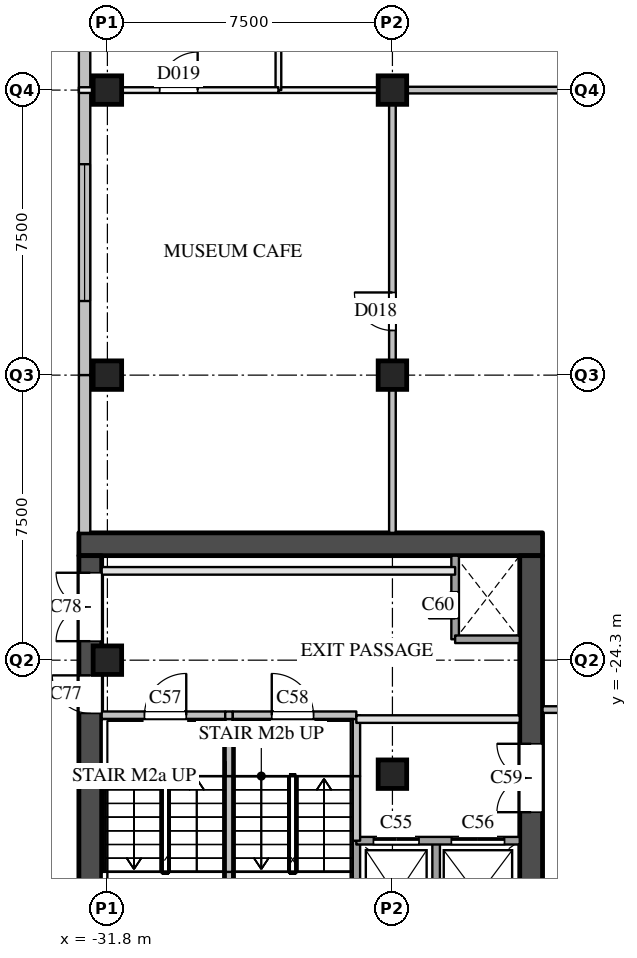
"""IFC4 building model, lengths in metres.
Left out: names, types, materials, properties, quantities, classifications, styles, units other than length and angle.
Written with IfcOpenShell. Run it as: python <this file> out.ifc"""

import sys

from ifc_helpers import new_model, si_unit, direction, frame, frame_2d, origin, origin_2d, place, context, subcontext, project, spatial, rectangle, extrude, element, fill, save


model = new_model("IFC4")
c1 = context("Model", 3, precision=1e-05, world=origin(), true_north=direction((0.0, 1.0)))
c2 = subcontext(c1, "Body", "Model", "MODEL_VIEW")
j1 = project(units=[si_unit("LENGTHUNIT", "METRE"), si_unit("PLANEANGLEUNIT", "RADIAN")], contexts=[c1])
p1 = place(None, origin())
s1 = spatial("IfcSite", under=j1, at=p1, CompositionType="ELEMENT")
p2 = place(p1, origin())
s2 = spatial("IfcBuilding", under=s1, at=p2, CompositionType="ELEMENT")
p3 = place(p2, origin())
s3 = spatial("IfcBuildingStorey", under=s2, at=p3, CompositionType="ELEMENT", Elevation=0.0)
for number, where, z_axis, x_axis in (
    (1, (-31.8, -24.3, 0.0), (0.0, 0.0, 1.0), (1.0, 0.0, 0.0)),
    (2, (-31.8, -16.8, 0.0), (0.0, 0.0, 1.0), (1.0, 0.0, 0.0)),
    (3, (-31.8, -9.3, 0.0), (0.0, 0.0, 1.0), (1.0, 0.0, 0.0)),
    (4, (-24.3, -16.8, 0.0), (0.0, 0.0, 1.0), (1.0, 0.0, 0.0)),
    (5, (-24.3, -9.3, 0.0), (0.0, 0.0, 1.0), (1.0, 0.0, 0.0)),
    (6, (-24.3, -27.3, 0.0), (0.0, 0.0, 1.0), (1.0, 0.0, 0.0)),
):
    element("IfcColumn", number, at=place(p3, frame(where, z_axis=z_axis, x_axis=x_axis)), inside=s3, PredefinedType="COLUMN", context=c2, shape_type="SweptSolid", body=[
        extrude(rectangle(XDim=0.75, YDim=0.75, at=origin_2d()), origin(), (0.0, 0.0, 1.0), 8.0),
    ])
p4 = place(p3, frame((-32.4, -1.8, 0.0), z_axis=(0.0, 0.0, 1.0), x_axis=(0.0, -1.0, 0.0)))
e7 = element("IfcWall", 7, at=p4, inside=s3, PredefinedType="SOLIDWALL", context=c2, shape_type="SweptSolid", body=[
    extrude(rectangle(XDim=7.5, YDim=0.3, at=frame_2d((3.75, 0.0))), origin(), (0.0, 0.0, 1.0), 7.59),
])
p5 = place(p4, frame((1.95, 0.0, 0.9)))
e8 = element("IfcOpeningElement", 8, at=p5, cuts=e7, PredefinedType="OPENING", context=c2, shape_type="SweptSolid", body=[
    extrude(rectangle(XDim=3.6, YDim=3.0, at=frame_2d((1.8, 1.5))), frame((0.0, 0.16, 0.0), z_axis=(0.0, -1.0, 0.0), x_axis=(1.0, 0.0, 0.0)), (0.0, 0.0, 1.0), 0.32),
])
p6 = place(p3, frame((-32.4, -9.3, 0.0), z_axis=(0.0, 0.0, 1.0), x_axis=(0.0, -1.0, 0.0)))
e9 = element("IfcWall", 9, at=p6, inside=s3, PredefinedType="SOLIDWALL", context=c2, shape_type="SweptSolid", body=[
    extrude(rectangle(XDim=7.5, YDim=0.3, at=frame_2d((3.75, 0.0))), origin(), (0.0, 0.0, 1.0), 7.59),
])
p7 = place(p6, frame((1.95, 0.0, 0.9)))
e10 = element("IfcOpeningElement", 10, at=p7, cuts=e9, PredefinedType="OPENING", context=c2, shape_type="SweptSolid", body=[
    extrude(rectangle(XDim=3.6, YDim=3.0, at=frame_2d((1.8, 1.5))), frame((0.0, 0.16, 0.0), z_axis=(0.0, -1.0, 0.0), x_axis=(1.0, 0.0, 0.0)), (0.0, 0.0, 1.0), 0.32),
])
p8 = place(p3, frame((-32.4, -16.8, 0.0), z_axis=(0.0, 0.0, 1.0), x_axis=(0.0, -1.0, 0.0)))
e11 = element("IfcWall", 11, at=p8, inside=s3, PredefinedType="SOLIDWALL", context=c2, shape_type="SweptSolid", body=[
    extrude(rectangle(XDim=4.15, YDim=0.3, at=frame_2d((2.075, 0.0))), origin(), (0.0, 0.0, 1.0), 7.59),
])
p9 = place(p3, frame((-32.55, -21.25, 0.0), z_axis=(0.0, 0.0, 1.0), x_axis=(1.0, 0.0, 0.0)))
e12 = element("IfcWall", 12, at=p9, inside=s3, PredefinedType="SHEAR", context=c2, shape_type="SweptSolid", body=[
    extrude(rectangle(XDim=12.2, YDim=0.6, at=frame_2d((6.1, 0.0))), origin(), (0.0, 0.0, 1.0), 7.59),
])
p10 = place(p3, frame((-32.25, -31.95, 0.0), z_axis=(0.0, 0.0, 1.0), x_axis=(0.0, 1.0, 0.0)))
e13 = element("IfcWall", 13, at=p10, inside=s3, PredefinedType="SHEAR", context=c2, shape_type="SweptSolid", body=[
    extrude(rectangle(XDim=10.4, YDim=0.6, at=frame_2d((5.2, 0.0))), origin(), (0.0, 0.0, 1.0), 7.59),
])
p11 = place(p10, frame((6.25, 0.0, 0.0)))
e14 = element("IfcOpeningElement", 14, at=p11, cuts=e13, PredefinedType="OPENING", context=c2, shape_type="SweptSolid", body=[
    extrude(rectangle(XDim=1.0, YDim=2.1, at=frame_2d((0.5, 1.05))), frame((0.0, 0.31, 0.0), z_axis=(0.0, -1.0, 0.0), x_axis=(1.0, 0.0, 0.0)), (0.0, 0.0, 1.0), 0.62),
])
p12 = place(p10, frame((8.15, 0.0, 0.0)))
e15 = element("IfcOpeningElement", 15, at=p12, cuts=e13, PredefinedType="OPENING", context=c2, shape_type="SweptSolid", body=[
    extrude(rectangle(XDim=1.8, YDim=2.4, at=frame_2d((0.9, 1.2))), frame((0.0, 0.31, 0.0), z_axis=(0.0, -1.0, 0.0), x_axis=(1.0, 0.0, 0.0)), (0.0, 0.0, 1.0), 0.62),
])
p13 = place(p3, frame((-20.65, -31.95, 0.0), z_axis=(0.0, 0.0, 1.0), x_axis=(0.0, 1.0, 0.0)))
e16 = element("IfcWall", 16, at=p13, inside=s3, PredefinedType="SHEAR", context=c2, shape_type="SweptSolid", body=[
    extrude(rectangle(XDim=10.4, YDim=0.6, at=frame_2d((5.2, 0.0))), origin(), (0.0, 0.0, 1.0), 7.59),
])
p14 = place(p13, frame((3.65, 0.0, 0.0)))
e17 = element("IfcOpeningElement", 17, at=p14, cuts=e16, PredefinedType="OPENING", context=c2, shape_type="SweptSolid", body=[
    extrude(rectangle(XDim=1.8, YDim=2.1, at=frame_2d((0.9, 1.05))), frame((0.0, 0.31, 0.0), z_axis=(0.0, -1.0, 0.0), x_axis=(1.0, 0.0, 0.0)), (0.0, 0.0, 1.0), 0.62),
])
p15 = place(p3, frame((-28.6, -31.95, 0.0), z_axis=(0.0, 0.0, 1.0), x_axis=(0.0, 1.0, 0.0)))
e18 = element("IfcWall", 18, at=p15, inside=s3, PredefinedType="SOLIDWALL", context=c2, shape_type="SweptSolid", body=[
    extrude(rectangle(XDim=2.08, YDim=0.2, at=frame_2d((1.04, 0.0))), origin(), (0.0, 0.0, 1.0), 7.59),
])
p16 = place(p3, frame((-28.6, -29.87, 0.0), z_axis=(0.0, 0.0, 1.0), x_axis=(0.0, 1.0, 0.0)))
e19 = element("IfcWall", 19, at=p16, inside=s3, PredefinedType="SOLIDWALL", context=c2, shape_type="SweptSolid", body=[
    extrude(rectangle(XDim=2.52, YDim=0.2, at=frame_2d((1.26, 0.0))), origin(), (0.0, 0.0, 1.0), 7.59),
])
p17 = place(p3, frame((-28.6, -27.35, 0.0), z_axis=(0.0, 0.0, 1.0), x_axis=(0.0, 1.0, 0.0)))
e20 = element("IfcWall", 20, at=p17, inside=s3, PredefinedType="SOLIDWALL", context=c2, shape_type="SweptSolid", body=[
    extrude(rectangle(XDim=1.6, YDim=0.2, at=frame_2d((0.8, 0.0))), origin(), (0.0, 0.0, 1.0), 7.59),
])
p18 = place(p3, frame((-25.25, -31.95, 0.0), z_axis=(0.0, 0.0, 1.0), x_axis=(0.0, 1.0, 0.0)))
e21 = element("IfcWall", 21, at=p18, inside=s3, PredefinedType="SOLIDWALL", context=c2, shape_type="SweptSolid", body=[
    extrude(rectangle(XDim=2.9, YDim=0.2, at=frame_2d((1.45, 0.0))), origin(), (0.0, 0.0, 1.0), 7.59),
])
p19 = place(p3, frame((-25.25, -29.05, 0.0), z_axis=(0.0, 0.0, 1.0), x_axis=(0.0, 1.0, 0.0)))
e22 = element("IfcWall", 22, at=p19, inside=s3, PredefinedType="SOLIDWALL", context=c2, shape_type="SweptSolid", body=[
    extrude(rectangle(XDim=1.7, YDim=0.2, at=frame_2d((0.85, 0.0))), origin(), (0.0, 0.0, 1.0), 7.59),
])
p20 = place(p3, frame((-25.25, -27.35, 0.0), z_axis=(0.0, 0.0, 1.0), x_axis=(0.0, 1.0, 0.0)))
e23 = element("IfcWall", 23, at=p20, inside=s3, PredefinedType="SOLIDWALL", context=c2, shape_type="SweptSolid", body=[
    extrude(rectangle(XDim=1.6, YDim=0.2, at=frame_2d((0.8, 0.0))), origin(), (0.0, 0.0, 1.0), 7.59),
])
p21 = place(p3, frame((-23.15, -31.95, 0.0), z_axis=(0.0, 0.0, 1.0), x_axis=(0.0, 1.0, 0.0)))
e24 = element("IfcWall", 24, at=p21, inside=s3, PredefinedType="SOLIDWALL", context=c2, shape_type="SweptSolid", body=[
    extrude(rectangle(XDim=2.9, YDim=0.2, at=frame_2d((1.45, 0.0))), origin(), (0.0, 0.0, 1.0), 7.59),
])
p22 = place(p3, frame((-22.65, -23.75, 0.0), z_axis=(0.0, 0.0, 1.0), x_axis=(0.0, 1.0, 0.0)))
e25 = element("IfcWall", 25, at=p22, inside=s3, PredefinedType="SOLIDWALL", context=c2, shape_type="SweptSolid", body=[
    extrude(rectangle(XDim=2.2, YDim=0.2, at=frame_2d((1.1, 0.0))), origin(), (0.0, 0.0, 1.0), 7.59),
])
p23 = place(p22, frame((0.55, 0.0, 0.0)))
e26 = element("IfcOpeningElement", 26, at=p23, cuts=e25, PredefinedType="OPENING", context=c2, shape_type="SweptSolid", body=[
    extrude(rectangle(XDim=0.7, YDim=2.1, at=frame_2d((0.35, 1.05))), frame((0.0, 0.11, 0.0), z_axis=(0.0, -1.0, 0.0), x_axis=(1.0, 0.0, 0.0)), (0.0, 0.0, 1.0), 0.22),
])
p24 = place(p3, frame((-25.25, -29.05, 0.0), z_axis=(0.0, 0.0, 1.0), x_axis=(1.0, 0.0, 0.0)))
e27 = element("IfcWall", 27, at=p24, inside=s3, PredefinedType="SOLIDWALL", context=c2, shape_type="SweptSolid", body=[
    extrude(rectangle(XDim=4.3, YDim=0.2, at=frame_2d((2.15, 0.0))), origin(), (0.0, 0.0, 1.0), 7.59),
])
p25 = place(p24, frame((0.45, 0.0, 0.0)))
e28 = element("IfcOpeningElement", 28, at=p25, cuts=e27, PredefinedType="OPENING", context=c2, shape_type="SweptSolid", body=[
    extrude(rectangle(XDim=1.2, YDim=2.1, at=frame_2d((0.6, 1.05))), frame((0.0, 0.11, 0.0), z_axis=(0.0, -1.0, 0.0), x_axis=(1.0, 0.0, 0.0)), (0.0, 0.0, 1.0), 0.22),
])
p26 = place(p24, frame((2.5, 0.0, 0.0)))
e29 = element("IfcOpeningElement", 29, at=p26, cuts=e27, PredefinedType="OPENING", context=c2, shape_type="SweptSolid", body=[
    extrude(rectangle(XDim=1.4, YDim=2.1, at=frame_2d((0.7, 1.05))), frame((0.0, 0.11, 0.0), z_axis=(0.0, -1.0, 0.0), x_axis=(1.0, 0.0, 0.0)), (0.0, 0.0, 1.0), 0.22),
])
p27 = place(p3, frame((-25.25, -25.85, 0.0), z_axis=(0.0, 0.0, 1.0), x_axis=(1.0, 0.0, 0.0)))
e30 = element("IfcWall", 30, at=p27, inside=s3, PredefinedType="PARTITIONING", context=c2, shape_type="SweptSolid", body=[
    extrude(rectangle(XDim=4.3, YDim=0.2, at=frame_2d((2.15, 0.0))), origin(), (0.0, 0.0, 1.0), 7.59),
])
p28 = place(p3, frame((-31.95, -25.75, 0.0), z_axis=(0.0, 0.0, 1.0), x_axis=(1.0, 0.0, 0.0)))
e31 = element("IfcWall", 31, at=p28, inside=s3, PredefinedType="SOLIDWALL", context=c2, shape_type="SweptSolid", body=[
    extrude(rectangle(XDim=3.25, YDim=0.2, at=frame_2d((1.625, 0.0))), origin(), (0.0, 0.0, 1.0), 7.59),
])
p29 = place(p28, frame((1.125, 0.0, 0.0)))
e32 = element("IfcOpeningElement", 32, at=p29, cuts=e31, PredefinedType="OPENING", context=c2, shape_type="SweptSolid", body=[
    extrude(rectangle(XDim=1.1, YDim=2.1, at=frame_2d((0.55, 1.05))), frame((0.0, 0.11, 0.0), z_axis=(0.0, -1.0, 0.0), x_axis=(1.0, 0.0, 0.0)), (0.0, 0.0, 1.0), 0.22),
])
p30 = place(p3, frame((-28.7, -25.75, 0.0), z_axis=(0.0, 0.0, 1.0), x_axis=(1.0, 0.0, 0.0)))
e33 = element("IfcWall", 33, at=p30, inside=s3, PredefinedType="SOLIDWALL", context=c2, shape_type="SweptSolid", body=[
    extrude(rectangle(XDim=0.2, YDim=0.2, at=frame_2d((0.1, 0.0))), origin(), (0.0, 0.0, 1.0), 7.59),
])
p31 = place(p3, frame((-28.5, -25.75, 0.0), z_axis=(0.0, 0.0, 1.0), x_axis=(1.0, 0.0, 0.0)))
e34 = element("IfcWall", 34, at=p31, inside=s3, PredefinedType="SOLIDWALL", context=c2, shape_type="SweptSolid", body=[
    extrude(rectangle(XDim=3.25, YDim=0.2, at=frame_2d((1.625, 0.0))), origin(), (0.0, 0.0, 1.0), 7.59),
])
p32 = place(p31, frame((1.025, 0.0, 0.0)))
e35 = element("IfcOpeningElement", 35, at=p32, cuts=e34, PredefinedType="OPENING", context=c2, shape_type="SweptSolid", body=[
    extrude(rectangle(XDim=1.1, YDim=2.1, at=frame_2d((0.55, 1.05))), frame((0.0, 0.11, 0.0), z_axis=(0.0, -1.0, 0.0), x_axis=(1.0, 0.0, 0.0)), (0.0, 0.0, 1.0), 0.22),
])
p33 = place(p3, frame((-22.65, -23.75, 0.0), z_axis=(0.0, 0.0, 1.0), x_axis=(1.0, 0.0, 0.0)))
e36 = element("IfcWall", 36, at=p33, inside=s3, PredefinedType="SOLIDWALL", context=c2, shape_type="SweptSolid", body=[
    extrude(rectangle(XDim=1.7, YDim=0.2, at=frame_2d((0.85, 0.0))), origin(), (0.0, 0.0, 1.0), 7.59),
])
p34 = place(p3, frame((-31.95, -21.95, 0.0), z_axis=(0.0, 0.0, 1.0), x_axis=(1.0, 0.0, 0.0)))
e37 = element("IfcWall", 37, at=p34, inside=s3, PredefinedType="PARTITIONING", context=c2, shape_type="SweptSolid", body=[
    extrude(rectangle(XDim=9.3, YDim=0.2, at=frame_2d((4.65, 0.0))), origin(), (0.0, 0.0, 1.0), 7.59),
])
p35 = place(p3, frame((-20.35, -25.6, 0.0), z_axis=(0.0, 0.0, 1.0), x_axis=(1.0, 0.0, 0.0)))
e38 = element("IfcWall", 38, at=p35, inside=s3, PredefinedType="PARTITIONING", context=c2, shape_type="SweptSolid", body=[
    extrude(rectangle(XDim=19.15, YDim=0.175, at=frame_2d((9.575, 0.0))), origin(), (0.0, 0.0, 1.0), 6.79),
])
p36 = place(p35, frame((4.625, 0.0, 0.0)))
e39 = element("IfcOpeningElement", 39, at=p36, cuts=e38, PredefinedType="OPENING", context=c2, shape_type="SweptSolid", body=[
    extrude(rectangle(XDim=1.8, YDim=2.1, at=frame_2d((0.9, 1.05))), frame((0.0, 0.097, 0.0), z_axis=(0.0, -1.0, 0.0), x_axis=(1.0, 0.0, 0.0)), (0.0, 0.0, 1.0), 0.195),
])
p37 = place(p35, frame((14.6, 0.0, 0.0)))
e40 = element("IfcOpeningElement", 40, at=p37, cuts=e38, PredefinedType="OPENING", context=c2, shape_type="SweptSolid", body=[
    extrude(rectangle(XDim=1.0, YDim=2.1, at=frame_2d((0.5, 1.05))), frame((0.0, 0.097, 0.0), z_axis=(0.0, -1.0, 0.0), x_axis=(1.0, 0.0, 0.0)), (0.0, 0.0, 1.0), 0.195),
])
p38 = place(p3, frame((-24.3, -9.3, 0.0), z_axis=(0.0, 0.0, 1.0), x_axis=(1.0, 0.0, 0.0)))
e41 = element("IfcWall", 41, at=p38, inside=s3, PredefinedType="PARTITIONING", context=c2, shape_type="SweptSolid", body=[
    extrude(rectangle(XDim=15.0, YDim=0.175, at=frame_2d((7.5, 0.0))), origin(), (0.0, 0.0, 1.0), 6.79),
])
p39 = place(p38, frame((11.1, 0.0, 0.0)))
e42 = element("IfcOpeningElement", 42, at=p39, cuts=e41, PredefinedType="OPENING", context=c2, shape_type="SweptSolid", body=[
    extrude(rectangle(XDim=1.8, YDim=2.1, at=frame_2d((0.9, 1.05))), frame((0.0, 0.097, 0.0), z_axis=(0.0, -1.0, 0.0), x_axis=(1.0, 0.0, 0.0)), (0.0, 0.0, 1.0), 0.195),
])
p40 = place(p3, frame((-24.3, -20.95, 0.0), z_axis=(0.0, 0.0, 1.0), x_axis=(0.0, 1.0, 0.0)))
e43 = element("IfcWall", 43, at=p40, inside=s3, PredefinedType="PARTITIONING", context=c2, shape_type="SweptSolid", body=[
    extrude(rectangle(XDim=11.65, YDim=0.175, at=frame_2d((5.825, 0.0))), origin(), (0.0, 0.0, 1.0), 6.79),
])
p41 = place(p40, frame((5.325, 0.0, 0.0)))
e44 = element("IfcOpeningElement", 44, at=p41, cuts=e43, PredefinedType="OPENING", context=c2, shape_type="SweptSolid", body=[
    extrude(rectangle(XDim=1.0, YDim=2.1, at=frame_2d((0.5, 1.05))), frame((0.0, 0.097, 0.0), z_axis=(0.0, -1.0, 0.0), x_axis=(1.0, 0.0, 0.0)), (0.0, 0.0, 1.0), 0.195),
])
p42 = place(p3, frame((-27.3, -9.3, 0.0), z_axis=(0.0, 0.0, 1.0), x_axis=(1.0, 0.0, 0.0)))
e45 = element("IfcWall", 45, at=p42, inside=s3, PredefinedType="PARTITIONING", context=c2, shape_type="SweptSolid", body=[
    extrude(rectangle(XDim=3.0, YDim=0.15, at=frame_2d((1.5, 0.0))), origin(), (0.0, 0.0, 1.0), 6.79),
])
p43 = place(p3, frame((-27.3, -9.3, 0.0), z_axis=(0.0, 0.0, 1.0), x_axis=(0.0, 1.0, 0.0)))
e46 = element("IfcWall", 46, at=p43, inside=s3, PredefinedType="PARTITIONING", context=c2, shape_type="SweptSolid", body=[
    extrude(rectangle(XDim=21.3, YDim=0.15, at=frame_2d((10.65, 0.0))), origin(), (0.0, 0.0, 1.0), 6.79),
])
p44 = place(p3, frame((-32.55, -9.3, 0.0), z_axis=(0.0, 0.0, 1.0), x_axis=(1.0, 0.0, 0.0)))
e47 = element("IfcWall", 47, at=p44, inside=s3, PredefinedType="PARTITIONING", context=c2, shape_type="SweptSolid", body=[
    extrude(rectangle(XDim=5.25, YDim=0.15, at=frame_2d((2.625, 0.0))), origin(), (0.0, 0.0, 1.0), 6.79),
])
p45 = place(p44, frame((2.125, 0.0, 0.0)))
e48 = element("IfcOpeningElement", 48, at=p45, cuts=e47, PredefinedType="OPENING", context=c2, shape_type="SweptSolid", body=[
    extrude(rectangle(XDim=1.0, YDim=2.1, at=frame_2d((0.5, 1.05))), frame((0.0, 0.085, 0.0), z_axis=(0.0, -1.0, 0.0), x_axis=(1.0, 0.0, 0.0)), (0.0, 0.0, 1.0), 0.17),
])
p46 = place(p7, origin())
e49 = element("IfcWindow", 49, at=p46, inside=s3, PartitioningType="SINGLE_PANEL", PredefinedType="WINDOW", context=c2, shape_type="SweptSolid", body=[
    extrude(rectangle(XDim=3.6, YDim=3.0, at=frame_2d((1.8, 1.5))), frame((0.0, 0.03, 0.0), z_axis=(0.0, -1.0, 0.0), x_axis=(1.0, 0.0, 0.0)), (0.0, 0.0, 1.0), 0.06),
])
fill(e10, e49)
p47 = place(p25, origin())
e50 = element("IfcDoor", 50, at=p47, inside=s3, OperationType="SLIDING_TO_LEFT", PredefinedType="DOOR", context=c2, shape_type="SweptSolid", body=[
    extrude(rectangle(XDim=1.2, YDim=2.1, at=frame_2d((0.6, 1.05))), frame((0.0, 0.025, 0.0), z_axis=(0.0, -1.0, 0.0), x_axis=(1.0, 0.0, 0.0)), (0.0, 0.0, 1.0), 0.05),
])
fill(e28, e50)
p48 = place(p26, origin())
e51 = element("IfcDoor", 51, at=p48, inside=s3, OperationType="SLIDING_TO_LEFT", PredefinedType="DOOR", context=c2, shape_type="SweptSolid", body=[
    extrude(rectangle(XDim=1.4, YDim=2.1, at=frame_2d((0.7, 1.05))), frame((0.0, 0.025, 0.0), z_axis=(0.0, -1.0, 0.0), x_axis=(1.0, 0.0, 0.0)), (0.0, 0.0, 1.0), 0.05),
])
fill(e29, e51)
p49 = place(p29, origin())
e52 = element("IfcDoor", 52, at=p49, inside=s3, OperationType="SINGLE_SWING_RIGHT", PredefinedType="DOOR", context=c2, shape_type="SweptSolid", body=[
    extrude(rectangle(XDim=1.1, YDim=2.1, at=frame_2d((0.55, 1.05))), frame((0.0, 0.025, 0.0), z_axis=(0.0, -1.0, 0.0), x_axis=(1.0, 0.0, 0.0)), (0.0, 0.0, 1.0), 0.05),
])
fill(e32, e52)
p50 = place(p32, origin())
e53 = element("IfcDoor", 53, at=p50, inside=s3, OperationType="SINGLE_SWING_LEFT", PredefinedType="DOOR", context=c2, shape_type="SweptSolid", body=[
    extrude(rectangle(XDim=1.1, YDim=2.1, at=frame_2d((0.55, 1.05))), frame((0.0, 0.025, 0.0), z_axis=(0.0, -1.0, 0.0), x_axis=(1.0, 0.0, 0.0)), (0.0, 0.0, 1.0), 0.05),
])
fill(e35, e53)
p51 = place(p14, origin())
e54 = element("IfcDoor", 54, at=p51, inside=s3, OperationType="DOUBLE_DOOR_SINGLE_SWING", PredefinedType="DOOR", context=c2, shape_type="SweptSolid", body=[
    extrude(rectangle(XDim=1.8, YDim=2.1, at=frame_2d((0.9, 1.05))), frame((0.0, 0.025, 0.0), z_axis=(0.0, -1.0, 0.0), x_axis=(1.0, 0.0, 0.0)), (0.0, 0.0, 1.0), 0.05),
])
fill(e17, e54)
p52 = place(p23, origin())
e55 = element("IfcDoor", 55, at=p52, inside=s3, OperationType="SINGLE_SWING_LEFT", PredefinedType="DOOR", context=c2, shape_type="SweptSolid", body=[
    extrude(rectangle(XDim=0.7, YDim=2.1, at=frame_2d((0.35, 1.05))), frame((0.0, 0.025, 0.0), z_axis=(0.0, -1.0, 0.0), x_axis=(1.0, 0.0, 0.0)), (0.0, 0.0, 1.0), 0.05),
])
fill(e26, e55)
p53 = place(p11, origin())
e56 = element("IfcDoor", 56, at=p53, inside=s3, OperationType="SINGLE_SWING_RIGHT", PredefinedType="DOOR", context=c2, shape_type="SweptSolid", body=[
    extrude(rectangle(XDim=1.0, YDim=2.1, at=frame_2d((0.5, 1.05))), frame((0.0, 0.025, 0.0), z_axis=(0.0, -1.0, 0.0), x_axis=(1.0, 0.0, 0.0)), (0.0, 0.0, 1.0), 0.05),
])
fill(e14, e56)
p54 = place(p12, origin())
e57 = element("IfcDoor", 57, at=p54, inside=s3, OperationType="DOUBLE_DOOR_SINGLE_SWING", PredefinedType="DOOR", context=c2, shape_type="SweptSolid", body=[
    extrude(rectangle(XDim=1.8, YDim=2.4, at=frame_2d((0.9, 1.2))), frame((0.0, 0.025, 0.0), z_axis=(0.0, -1.0, 0.0), x_axis=(1.0, 0.0, 0.0)), (0.0, 0.0, 1.0), 0.05),
])
fill(e15, e57)
p55 = place(p41, origin())
e58 = element("IfcDoor", 58, at=p55, inside=s3, OperationType="SINGLE_SWING_RIGHT", PredefinedType="DOOR", context=c2, shape_type="SweptSolid", body=[
    extrude(rectangle(XDim=1.0, YDim=2.1, at=frame_2d((0.5, 1.05))), frame((0.0, 0.025, 0.0), z_axis=(0.0, -1.0, 0.0), x_axis=(1.0, 0.0, 0.0)), (0.0, 0.0, 1.0), 0.05),
])
fill(e44, e58)
p56 = place(p45, origin())
e59 = element("IfcDoor", 59, at=p56, inside=s3, OperationType="SINGLE_SWING_RIGHT", PredefinedType="DOOR", context=c2, shape_type="SweptSolid", body=[
    extrude(rectangle(XDim=1.0, YDim=2.1, at=frame_2d((0.5, 1.05))), frame((0.0, 0.025, 0.0), z_axis=(0.0, -1.0, 0.0), x_axis=(1.0, 0.0, 0.0)), (0.0, 0.0, 1.0), 0.05),
])
fill(e48, e59)
save(model, sys.argv[1])
